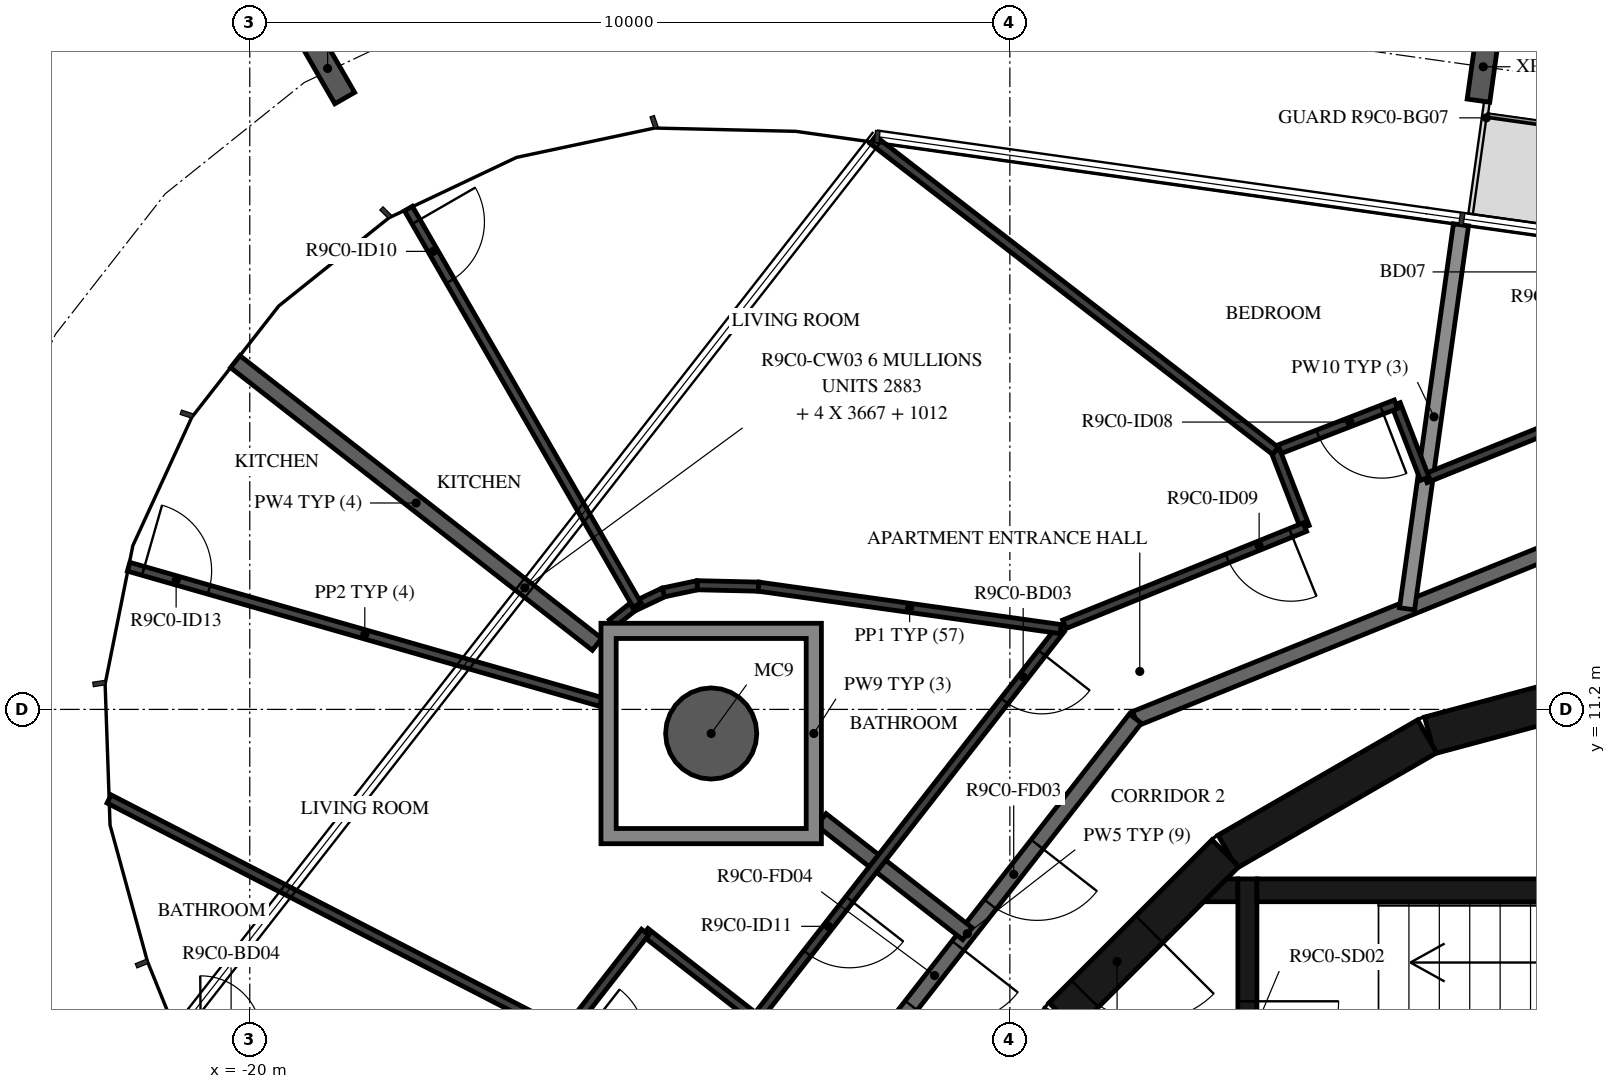
"""IFC4 building model, lengths in metres.
Left out: names, types, materials, properties, quantities, classifications, styles, units other than length and angle.
Written with IfcOpenShell. Run it as: python <this file> out.ifc"""

import sys

from ifc_helpers import new_model, si_unit, direction, frame, frame_2d, origin, origin_2d, place, context, subcontext, project, spatial, polyline, rectangle, hollow_circle, i_section, outline, extrude, element, fill, save


model = new_model("IFC4")
c1 = context("Model", 3, precision=1e-05, world=origin(), true_north=direction((0.0, 1.0)))
c2 = subcontext(c1, "Body", "Model", "MODEL_VIEW")
j1 = project(units=[si_unit("LENGTHUNIT", "METRE"), si_unit("PLANEANGLEUNIT", "RADIAN")], contexts=[c1])
p1 = place(None, origin())
s1 = spatial("IfcSite", under=j1, at=p1, CompositionType="ELEMENT")
p2 = place(p1, origin())
s2 = spatial("IfcBuilding", under=s1, at=p2, CompositionType="ELEMENT")
p3 = place(p2, frame((0.0, 0.0, 354.0)))
s3 = spatial("IfcBuildingStorey", under=s2, at=p3, CompositionType="ELEMENT", Elevation=354.0)
p4 = place(p3, frame((-13.929, 10.883, -0.38), z_axis=(0.0, 0.0, 1.0), x_axis=(1.0, 0.0, 0.0)))
e1 = element("IfcColumn", 1, at=p4, inside=s3, PredefinedType="COLUMN", context=c2, shape_type="SweptSolid", body=[
    extrude(hollow_circle(Radius=0.6, WallThickness=0.03, at=origin_2d()), origin(), (0.0, 0.0, 1.0), 3.5),
])
for number, where, z_axis, x_axis in (
    (2, (-3.773, 19.655, -0.38), (0.0, 0.0, 1.0), (0.99, -0.139, 0.0)),
    (3, (-18.976, 19.632, -0.38), (0.0, 0.0, 1.0), (0.866, 0.5, 0.0)),
):
    element("IfcColumn", number, at=place(p3, frame(where, z_axis=z_axis, x_axis=x_axis)), inside=s3, PredefinedType="COLUMN", context=c2, shape_type="SweptSolid", body=[
        extrude(i_section(OverallWidth=0.3, OverallDepth=0.9, WebThickness=0.019, FlangeThickness=0.035, FilletRadius=0.03, at=origin_2d()), origin(), (0.0, 0.0, 1.0), 3.5),
    ])
for number, where, z_axis, x_axis in (
    (4, (-1.55, 11.643, 0.0), (0.0, 0.0, 1.0), (-0.966, -0.259, 0.0)),
    (5, (-4.51, 10.845, 0.0), (0.0, 0.0, 1.0), (-0.866, -0.5, 0.0)),
):
    element("IfcWall", number, at=place(p3, frame(where, z_axis=z_axis, x_axis=x_axis)), inside=s3, PredefinedType="SHEAR", context=c2, shape_type="SweptSolid", body=[
        extrude(rectangle(XDim=3.033, YDim=0.5, at=frame_2d((1.516, 0.0))), origin(), (0.0, 0.0, 1.0), 3.12),
    ])
p5 = place(p3, frame((-7.164, 9.308, 0.0), z_axis=(0.0, 0.0, 1.0), x_axis=(-0.707106781187, -0.707106781187, 0.0)))
e6 = element("IfcWall", 6, at=p5, inside=s3, PredefinedType="SHEAR", context=c2, shape_type="SweptSolid", body=[
    extrude(rectangle(XDim=3.032, YDim=0.5, at=frame_2d((1.516, 0.0))), origin(), (0.0, 0.0, 1.0), 3.12),
])
p6 = place(p5, frame((1.416, 0.0, 0.0)))
e7 = element("IfcOpeningElement", 7, at=p6, cuts=e6, PredefinedType="OPENING", context=c2, shape_type="SweptSolid", body=[
    extrude(rectangle(XDim=1.2, YDim=2.1, at=frame_2d((0.6, 1.05))), frame((0.0, 0.26, 0.0), z_axis=(0.0, -1.0, 0.0), x_axis=(1.0, 0.0, 0.0)), (0.0, 0.0, 1.0), 0.52),
])
p7 = place(p3, frame((-9.329, 7.137, 0.0), z_axis=(0.0, 0.0, 1.0), x_axis=(-0.500087131594, -0.865975092491, 0.0)))
e8 = element("IfcWall", 8, at=p7, inside=s3, PredefinedType="SHEAR", context=c2, shape_type="SweptSolid", body=[
    extrude(rectangle(XDim=3.033, YDim=0.5, at=frame_2d((1.516, 0.0))), origin(), (0.0, 0.0, 1.0), 3.12),
])
p8 = place(p3, frame((-6.75, 8.82, 0.0), z_axis=(0.0, 0.0, 1.0), x_axis=(1.0, 0.0, 0.0)))
e9 = element("IfcWall", 9, at=p8, inside=s3, PredefinedType="SHEAR", context=c2, shape_type="SweptSolid", body=[
    extrude(rectangle(XDim=6.75, YDim=0.3, at=frame_2d((3.375, 0.0))), origin(), (0.0, 0.0, 1.0), 3.12),
])
p9 = place(p3, frame((-6.875, 8.97, 0.0), z_axis=(0.0, 0.0, 1.0), x_axis=(0.0, -1.0, 0.0)))
e10 = element("IfcWall", 10, at=p9, inside=s3, PredefinedType="SHEAR", context=c2, shape_type="SweptSolid", body=[
    extrude(rectangle(XDim=3.92, YDim=0.25, at=frame_2d((1.96, 0.0))), origin(), (0.0, 0.0, 1.0), 3.12),
])
p10 = place(p9, frame((1.61, 0.0, 0.0)))
e11 = element("IfcOpeningElement", 11, at=p10, cuts=e10, PredefinedType="OPENING", context=c2, shape_type="SweptSolid", body=[
    extrude(rectangle(XDim=1.2, YDim=2.1, at=frame_2d((0.6, 1.05))), frame((0.0, 0.135, 0.0), z_axis=(0.0, -1.0, 0.0), x_axis=(1.0, 0.0, 0.0)), (0.0, 0.0, 1.0), 0.27),
])
p11 = place(p3, origin())
e12 = element("IfcWall", 12, at=p11, inside=s3, PredefinedType="SHEAR", context=c2, shape_type="SweptSolid", body=[
    extrude(outline(polyline([(-7.148, 8.97), (-7.0, 8.97), (-7.0, 8.67), (-7.448, 8.67), (-7.148, 8.97)])), origin(), (0.0, 0.0, 1.0), 3.12),
])
p12 = place(p3, frame((-1.691, 13.769, 0.0), z_axis=(0.0, 0.0, 1.0), x_axis=(-0.92717916932, -0.374618189599, 0.0)))
e13 = element("IfcWall", 13, at=p12, inside=s3, PredefinedType="STANDARD", context=c2, shape_type="SweptSolid", body=[
    extrude(rectangle(XDim=7.181, YDim=0.2, at=frame_2d((3.591, 0.0))), origin(), (0.0, 0.0, 1.0), 3.12),
])
p13 = place(p3, frame((-8.349, 11.079, 0.0), z_axis=(0.0, 0.0, 1.0), x_axis=(-0.615669112324, -0.78800478687, 0.0)))
e14 = element("IfcWall", 14, at=p13, inside=s3, PredefinedType="STANDARD", context=c2, shape_type="SweptSolid", body=[
    extrude(rectangle(XDim=7.181, YDim=0.2, at=frame_2d((3.591, 0.0))), origin(), (0.0, 0.0, 1.0), 3.12),
])
p14 = place(p13, frame((2.1, 0.0, 0.0)))
e15 = element("IfcOpeningElement", 15, at=p14, cuts=e14, PredefinedType="OPENING", context=c2, shape_type="SweptSolid", body=[
    extrude(rectangle(XDim=1.0, YDim=2.1, at=frame_2d((0.5, 1.05))), frame((0.0, 0.11, 0.0), z_axis=(0.0, -1.0, 0.0), x_axis=(1.0, 0.0, 0.0)), (0.0, 0.0, 1.0), 0.22),
])
p15 = place(p13, frame((3.79, 0.0, 0.0)))
e16 = element("IfcOpeningElement", 16, at=p15, cuts=e14, PredefinedType="OPENING", context=c2, shape_type="SweptSolid", body=[
    extrude(rectangle(XDim=1.0, YDim=2.1, at=frame_2d((0.5, 1.05))), frame((0.0, 0.11, 0.0), z_axis=(0.0, -1.0, 0.0), x_axis=(1.0, 0.0, 0.0)), (0.0, 0.0, 1.0), 0.22),
])
p16 = place(p3, frame((-4.065, 17.575, 0.0), z_axis=(0.0, 0.0, 1.0), x_axis=(-0.139163175955, -0.990269463559, 0.0)))
e17 = element("IfcWall", 17, at=p16, inside=s3, PredefinedType="STANDARD", context=c2, shape_type="SweptSolid", body=[
    extrude(rectangle(XDim=5.102, YDim=0.2, at=frame_2d((2.551, 0.0))), origin(), (0.0, 0.0, 1.0), 2.73),
])
p17 = place(p3, frame((-12.479, 9.75, 0.0), z_axis=(0.0, 0.0, 1.0), x_axis=(0.788050197026, -0.615610986717, 0.0)))
e18 = element("IfcWall", 18, at=p17, inside=s3, PredefinedType="STANDARD", context=c2, shape_type="SweptSolid", body=[
    extrude(rectangle(XDim=2.437, YDim=0.2, at=frame_2d((1.218, 0.0))), origin(), (0.0, 0.0, 1.0), 3.12),
])
p18 = place(p3, frame((-20.191, 15.775, 0.0), z_axis=(0.0, 0.0, 1.0), x_axis=(0.788013955741, -0.615657376758, 0.0)))
e19 = element("IfcWall", 19, at=p18, inside=s3, PredefinedType="STANDARD", context=c2, shape_type="SweptSolid", body=[
    extrude(rectangle(XDim=6.04, YDim=0.2, at=frame_2d((3.02, 0.0))), origin(), (0.0, 0.0, 1.0), 3.12),
])
p19 = place(p3, frame((-1.88, 15.311, 0.0), z_axis=(0.0, 0.0, 1.0), x_axis=(-0.927176894493, -0.374623819743, 0.0)))
e20 = element("IfcWall", 20, at=p19, inside=s3, PredefinedType="PARTITIONING", context=c2, shape_type="SweptSolid", body=[
    extrude(rectangle(XDim=2.862, YDim=0.12, at=frame_2d((1.431, 0.0))), origin(), (0.0, 0.0, 1.0), 3.12),
])
p20 = place(p3, frame((-4.542, 14.235, 0.0), z_axis=(0.0, 0.0, 1.0), x_axis=(-0.360785401119, 0.932648859078, 0.0)))
e21 = element("IfcWall", 21, at=p20, inside=s3, PredefinedType="PARTITIONING", context=c2, shape_type="SweptSolid", body=[
    extrude(rectangle(XDim=1.05, YDim=0.12, at=frame_2d((0.525, 0.0))), origin(), (0.0, 0.0, 1.0), 3.12),
])
p21 = place(p3, frame((-4.921, 15.215, 0.0), z_axis=(0.0, 0.0, 1.0), x_axis=(-0.93265541153, -0.360768462236, 0.0)))
e22 = element("IfcWall", 22, at=p21, inside=s3, PredefinedType="PARTITIONING", context=c2, shape_type="SweptSolid", body=[
    extrude(rectangle(XDim=1.7, YDim=0.12, at=frame_2d((0.85, 0.0))), origin(), (0.0, 0.0, 1.0), 3.12),
])
p22 = place(p21, frame((0.2, 0.0, 0.0)))
e23 = element("IfcOpeningElement", 23, at=p22, cuts=e22, PredefinedType="OPENING", context=c2, shape_type="SweptSolid", body=[
    extrude(rectangle(XDim=0.9, YDim=2.1, at=frame_2d((0.45, 1.05))), frame((0.0, 0.07, 0.0), z_axis=(0.0, -1.0, 0.0), x_axis=(1.0, 0.0, 0.0)), (0.0, 0.0, 1.0), 0.14),
])
p23 = place(p3, frame((-6.506, 14.601, 0.0), z_axis=(0.0, 0.0, 1.0), x_axis=(0.36075842677, -0.932659293373, 0.0)))
e24 = element("IfcWall", 24, at=p23, inside=s3, PredefinedType="PARTITIONING", context=c2, shape_type="SweptSolid", body=[
    extrude(rectangle(XDim=1.075, YDim=0.12, at=frame_2d((0.538, 0.0))), origin(), (0.0, 0.0, 1.0), 3.12),
])
p24 = place(p3, frame((-6.118, 13.598, 0.0), z_axis=(0.0, 0.0, 1.0), x_axis=(-0.927163982911, -0.374655773735, 0.0)))
e25 = element("IfcWall", 25, at=p24, inside=s3, PredefinedType="PARTITIONING", context=c2, shape_type="SweptSolid", body=[
    extrude(rectangle(XDim=3.414, YDim=0.12, at=frame_2d((1.707, 0.0))), origin(), (0.0, 0.0, 1.0), 3.12),
])
p25 = place(p24, frame((0.2, 0.0, 0.0)))
e26 = element("IfcOpeningElement", 26, at=p25, cuts=e25, PredefinedType="OPENING", context=c2, shape_type="SweptSolid", body=[
    extrude(rectangle(XDim=0.9, YDim=2.1, at=frame_2d((0.45, 1.05))), frame((0.0, 0.07, 0.0), z_axis=(0.0, -1.0, 0.0), x_axis=(1.0, 0.0, 0.0)), (0.0, 0.0, 1.0), 0.14),
])
p26 = place(p3, frame((-9.333, 12.257, 0.0), z_axis=(0.0, 0.0, 1.0), x_axis=(-0.615643313808, -0.788024942602, 0.0)))
e27 = element("IfcWall", 27, at=p26, inside=s3, PredefinedType="PARTITIONING", context=c2, shape_type="SweptSolid", body=[
    extrude(rectangle(XDim=6.506, YDim=0.12, at=frame_2d((3.253, 0.0))), origin(), (0.0, 0.0, 1.0), 3.12),
])
p27 = place(p26, frame((0.4, 0.0, 0.0)))
e28 = element("IfcOpeningElement", 28, at=p27, cuts=e27, PredefinedType="OPENING", context=c2, shape_type="SweptSolid", body=[
    extrude(rectangle(XDim=0.8, YDim=2.1, at=frame_2d((0.4, 1.05))), frame((0.0, 0.07, 0.0), z_axis=(0.0, -1.0, 0.0), x_axis=(1.0, 0.0, 0.0)), (0.0, 0.0, 1.0), 0.14),
])
p28 = place(p26, frame((4.512, 0.0, 0.0)))
e29 = element("IfcOpeningElement", 29, at=p28, cuts=e27, PredefinedType="OPENING", context=c2, shape_type="SweptSolid", body=[
    extrude(rectangle(XDim=0.9, YDim=2.1, at=frame_2d((0.45, 1.05))), frame((0.0, 0.07, 0.0), z_axis=(0.0, -1.0, 0.0), x_axis=(1.0, 0.0, 0.0)), (0.0, 0.0, 1.0), 0.14),
])
p29 = place(p3, frame((-11.803, 18.693, 0.0), z_axis=(0.0, 0.0, 1.0), x_axis=(0.791388468332, -0.611313579262, 0.0)))
e30 = element("IfcWall", 30, at=p29, inside=s3, PredefinedType="PARTITIONING", context=c2, shape_type="SweptSolid", body=[
    extrude(rectangle(XDim=6.693, YDim=0.12, at=frame_2d((3.347, 0.0))), origin(), (0.0, 0.0, 1.0), 3.12),
])
p30 = place(p3, frame((-14.941, 12.557, 0.0), z_axis=(0.0, 0.0, 1.0), x_axis=(0.903749522455, 0.428061678572, 0.0)))
e31 = element("IfcWall", 31, at=p30, inside=s3, PredefinedType="PARTITIONING", context=c2, shape_type="SweptSolid", body=[
    extrude(rectangle(XDim=0.426, YDim=0.12, at=frame_2d((0.213, 0.0))), origin(), (0.0, 0.0, 1.0), 3.12),
])
p31 = place(p3, frame((-14.557, 12.739, 0.0), z_axis=(0.0, 0.0, 1.0), x_axis=(0.978201106396, 0.207659807008, 0.0)))
e32 = element("IfcWall", 32, at=p31, inside=s3, PredefinedType="PARTITIONING", context=c2, shape_type="SweptSolid", body=[
    extrude(rectangle(XDim=0.455, YDim=0.12, at=frame_2d((0.228, 0.0))), origin(), (0.0, 0.0, 1.0), 3.12),
])
p32 = place(p3, frame((-14.112, 12.833, 0.0), z_axis=(0.0, 0.0, 1.0), x_axis=(0.999735389157, -0.023003296874, 0.0)))
e33 = element("IfcWall", 33, at=p32, inside=s3, PredefinedType="PARTITIONING", context=c2, shape_type="SweptSolid", body=[
    extrude(rectangle(XDim=0.807, YDim=0.12, at=frame_2d((0.403, 0.0))), origin(), (0.0, 0.0, 1.0), 3.12),
])
p33 = place(p3, frame((-13.305, 12.815, 0.0), z_axis=(0.0, 0.0, 1.0), x_axis=(0.990267066123, -0.139180234773, 0.0)))
e34 = element("IfcWall", 34, at=p33, inside=s3, PredefinedType="PARTITIONING", context=c2, shape_type="SweptSolid", body=[
    extrude(rectangle(XDim=4.012, YDim=0.12, at=frame_2d((2.006, 0.0))), origin(), (0.0, 0.0, 1.0), 3.12),
])
p34 = place(p3, frame((-17.912, 17.789, 0.0), z_axis=(0.0, 0.0, 1.0), x_axis=(0.499615949423, -0.866247021976, 0.0)))
e35 = element("IfcWall", 35, at=p34, inside=s3, PredefinedType="PARTITIONING", context=c2, shape_type="SweptSolid", body=[
    extrude(rectangle(XDim=6.02, YDim=0.12, at=frame_2d((3.01, 0.0))), origin(), (0.0, 0.0, 1.0), 2.73),
])
p35 = place(p34, frame((0.2, 0.0, 0.0)))
e36 = element("IfcOpeningElement", 36, at=p35, cuts=e35, PredefinedType="OPENING", context=c2, shape_type="SweptSolid", body=[
    extrude(rectangle(XDim=0.9, YDim=2.1, at=frame_2d((0.45, 1.05))), frame((0.0, 0.07, 0.0), z_axis=(0.0, -1.0, 0.0), x_axis=(1.0, 0.0, 0.0)), (0.0, 0.0, 1.0), 0.14),
])
p36 = place(p3, frame((-14.968, 12.544, 0.0), z_axis=(0.0, 0.0, 1.0), x_axis=(-0.780727997402, -0.62487102195, 0.0)))
e37 = element("IfcWall", 37, at=p36, inside=s3, PredefinedType="PARTITIONING", context=c2, shape_type="SweptSolid", body=[
    extrude(rectangle(XDim=0.338, YDim=0.12, at=frame_2d((0.169, 0.0))), origin(), (0.0, 0.0, 1.0), 3.12),
])
p37 = place(p3, frame((-13.338, 7.129, 0.0), z_axis=(0.0, 0.0, 1.0), x_axis=(-0.787938483233, 0.615753965997, 0.0)))
e38 = element("IfcWall", 38, at=p37, inside=s3, PredefinedType="PARTITIONING", context=c2, shape_type="SweptSolid", body=[
    extrude(rectangle(XDim=1.853, YDim=0.12, at=frame_2d((0.927, 0.0))), origin(), (0.0, 0.0, 1.0), 3.12),
])
p38 = place(p3, frame((-14.798, 8.271, 0.0), z_axis=(0.0, 0.0, 1.0), x_axis=(-0.615669123866, -0.788004777852, 0.0)))
e39 = element("IfcWall", 39, at=p38, inside=s3, PredefinedType="PARTITIONING", context=c2, shape_type="SweptSolid", body=[
    extrude(rectangle(XDim=1.7, YDim=0.12, at=frame_2d((0.85, 0.0))), origin(), (0.0, 0.0, 1.0), 3.12),
])
p39 = place(p3, frame((-21.594, 13.077, 0.0), z_axis=(0.0, 0.0, 1.0), x_axis=(0.961389857774, -0.275190009576, 0.0)))
e40 = element("IfcWall", 40, at=p39, inside=s3, PredefinedType="PARTITIONING", context=c2, shape_type="SweptSolid", body=[
    extrude(rectangle(XDim=6.464, YDim=0.12, at=frame_2d((3.232, 0.0))), origin(), (0.0, 0.0, 1.0), 2.73),
])
p40 = place(p39, frame((0.2, 0.0, 0.0)))
e41 = element("IfcOpeningElement", 41, at=p40, cuts=e40, PredefinedType="OPENING", context=c2, shape_type="SweptSolid", body=[
    extrude(rectangle(XDim=0.9, YDim=2.1, at=frame_2d((0.45, 1.05))), frame((0.0, 0.07, 0.0), z_axis=(0.0, -1.0, 0.0), x_axis=(1.0, 0.0, 0.0)), (0.0, 0.0, 1.0), 0.14),
])
p41 = place(p3, frame((-21.85, 10.021, 0.0), z_axis=(0.0, 0.0, 1.0), x_axis=(0.889153763622, -0.457608549567, 0.0)))
e42 = element("IfcWall", 42, at=p41, inside=s3, PredefinedType="PARTITIONING", context=c2, shape_type="SweptSolid", body=[
    extrude(rectangle(XDim=6.754, YDim=0.12, at=frame_2d((3.377, 0.0))), origin(), (0.0, 0.0, 1.0), 3.12),
])
p42 = place(p3, origin())
e43 = element("IfcWall", 43, at=p42, inside=s3, PredefinedType="STANDARD", context=c2, shape_type="SweptSolid", body=[
    extrude(outline(polyline([(-12.479, 12.333), (-12.479, 9.433), (-15.379, 9.433), (-15.379, 12.333), (-12.479, 12.333)]), holes=[polyline([(-15.179, 9.633), (-12.679, 9.633), (-12.679, 12.133), (-15.179, 12.133), (-15.179, 9.633)])]), origin(), (0.0, 0.0, 1.0), 3.12),
])
p43 = place(p10, origin())
e44 = element("IfcDoor", 44, at=p43, inside=s3, OperationType="SINGLE_SWING_LEFT", PredefinedType="DOOR", context=c2, shape_type="SweptSolid", body=[
    extrude(rectangle(XDim=1.2, YDim=2.1, at=frame_2d((0.6, 1.05))), frame((0.0, 0.025, 0.0), z_axis=(0.0, -1.0, 0.0), x_axis=(1.0, 0.0, 0.0)), (0.0, 0.0, 1.0), 0.05),
])
fill(e11, e44)
p44 = place(p6, origin())
e45 = element("IfcDoor", 45, at=p44, inside=s3, OperationType="SINGLE_SWING_RIGHT", PredefinedType="DOOR", context=c2, shape_type="SweptSolid", body=[
    extrude(rectangle(XDim=1.2, YDim=2.1, at=frame_2d((0.6, 1.05))), frame((0.0, 0.025, 0.0), z_axis=(0.0, -1.0, 0.0), x_axis=(1.0, 0.0, 0.0)), (0.0, 0.0, 1.0), 0.05),
])
fill(e7, e45)
p45 = place(p14, origin())
e46 = element("IfcDoor", 46, at=p45, inside=s3, OperationType="SINGLE_SWING_RIGHT", PredefinedType="DOOR", context=c2, shape_type="SweptSolid", body=[
    extrude(rectangle(XDim=1.0, YDim=2.1, at=frame_2d((0.5, 1.05))), frame((0.0, 0.025, 0.0), z_axis=(0.0, -1.0, 0.0), x_axis=(1.0, 0.0, 0.0)), (0.0, 0.0, 1.0), 0.05),
])
fill(e15, e46)
p46 = place(p22, origin())
e47 = element("IfcDoor", 47, at=p46, inside=s3, OperationType="SINGLE_SWING_RIGHT", PredefinedType="DOOR", context=c2, shape_type="SweptSolid", body=[
    extrude(rectangle(XDim=0.9, YDim=2.1, at=frame_2d((0.45, 1.05))), frame((0.0, 0.025, 0.0), z_axis=(0.0, -1.0, 0.0), x_axis=(1.0, 0.0, 0.0)), (0.0, 0.0, 1.0), 0.05),
])
fill(e23, e47)
p47 = place(p25, origin())
e48 = element("IfcDoor", 48, at=p47, inside=s3, OperationType="SINGLE_SWING_RIGHT", PredefinedType="DOOR", context=c2, shape_type="SweptSolid", body=[
    extrude(rectangle(XDim=0.9, YDim=2.1, at=frame_2d((0.45, 1.05))), frame((0.0, 0.025, 0.0), z_axis=(0.0, -1.0, 0.0), x_axis=(1.0, 0.0, 0.0)), (0.0, 0.0, 1.0), 0.05),
])
fill(e26, e48)
p48 = place(p27, origin())
e49 = element("IfcDoor", 49, at=p48, inside=s3, OperationType="SINGLE_SWING_RIGHT", PredefinedType="DOOR", context=c2, shape_type="SweptSolid", body=[
    extrude(rectangle(XDim=0.8, YDim=2.1, at=frame_2d((0.4, 1.05))), frame((0.0, 0.025, 0.0), z_axis=(0.0, -1.0, 0.0), x_axis=(1.0, 0.0, 0.0)), (0.0, 0.0, 1.0), 0.05),
])
fill(e28, e49)
p49 = place(p35, origin())
e50 = element("IfcDoor", 50, at=p49, inside=s3, OperationType="SINGLE_SWING_RIGHT", PredefinedType="DOOR", context=c2, shape_type="SweptSolid", body=[
    extrude(rectangle(XDim=0.9, YDim=2.1, at=frame_2d((0.45, 1.05))), frame((0.0, 0.025, 0.0), z_axis=(0.0, -1.0, 0.0), x_axis=(1.0, 0.0, 0.0)), (0.0, 0.0, 1.0), 0.05),
])
fill(e36, e50)
p50 = place(p15, origin())
e51 = element("IfcDoor", 51, at=p50, inside=s3, OperationType="SINGLE_SWING_LEFT", PredefinedType="DOOR", context=c2, shape_type="SweptSolid", body=[
    extrude(rectangle(XDim=1.0, YDim=2.1, at=frame_2d((0.5, 1.05))), frame((0.0, 0.025, 0.0), z_axis=(0.0, -1.0, 0.0), x_axis=(1.0, 0.0, 0.0)), (0.0, 0.0, 1.0), 0.05),
])
fill(e16, e51)
p51 = place(p28, origin())
e52 = element("IfcDoor", 52, at=p51, inside=s3, OperationType="SINGLE_SWING_LEFT", PredefinedType="DOOR", context=c2, shape_type="SweptSolid", body=[
    extrude(rectangle(XDim=0.9, YDim=2.1, at=frame_2d((0.45, 1.05))), frame((0.0, 0.025, 0.0), z_axis=(0.0, -1.0, 0.0), x_axis=(1.0, 0.0, 0.0)), (0.0, 0.0, 1.0), 0.05),
])
fill(e29, e52)
p52 = place(p40, origin())
e53 = element("IfcDoor", 53, at=p52, inside=s3, OperationType="SINGLE_SWING_LEFT", PredefinedType="DOOR", context=c2, shape_type="SweptSolid", body=[
    extrude(rectangle(XDim=0.9, YDim=2.1, at=frame_2d((0.45, 1.05))), frame((0.0, 0.025, 0.0), z_axis=(0.0, -1.0, 0.0), x_axis=(1.0, 0.0, 0.0)), (0.0, 0.0, 1.0), 0.05),
])
fill(e41, e53)
save(model, sys.argv[1])
